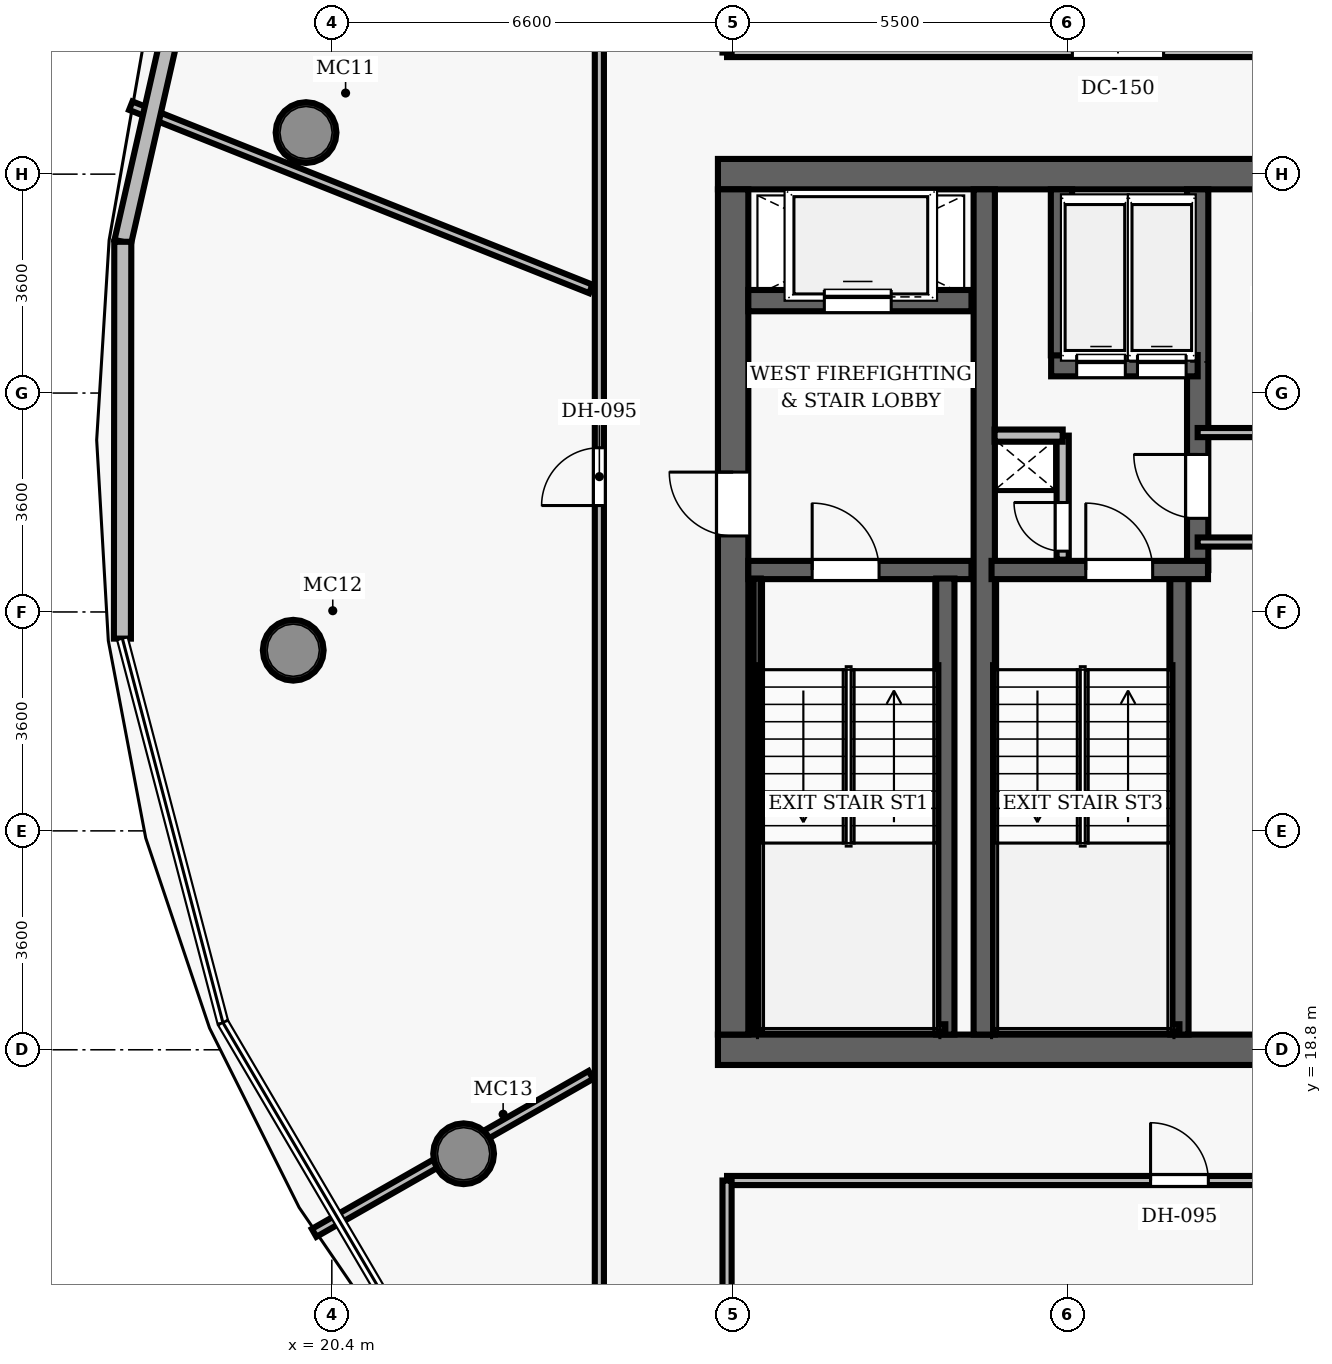
"""IFC4 building model, lengths in metres.
Left out: names, types, materials, properties, quantities, classifications, styles, units other than length and angle.
Written with IfcOpenShell. Run it as: python <this file> out.ifc"""

import sys

from ifc_helpers import new_model, si_unit, direction, frame, frame_2d, origin, origin_2d, place, context, subcontext, project, spatial, rectangle, hollow_circle, extrude, element, fill, save


model = new_model("IFC4")
c1 = context("Model", 3, precision=1e-05, world=origin(), true_north=direction((0.0, 1.0)))
c2 = subcontext(c1, "Body", "Model", "MODEL_VIEW")
j1 = project(units=[si_unit("LENGTHUNIT", "METRE"), si_unit("PLANEANGLEUNIT", "RADIAN")], contexts=[c1])
p1 = place(None, origin())
s1 = spatial("IfcSite", under=j1, at=p1, CompositionType="ELEMENT")
p2 = place(p1, origin())
s2 = spatial("IfcBuilding", under=s1, at=p2, CompositionType="ELEMENT")
p3 = place(p2, frame((0.0, 0.0, 303.65)))
s3 = spatial("IfcBuildingStorey", under=s2, at=p3, CompositionType="ELEMENT", Elevation=303.65)
p4 = place(p3, frame((26.75, 18.8, 0.0), z_axis=(0.0, 0.0, 1.0), x_axis=(1.0, 0.0, 0.0)))
e1 = element("IfcWall", 1, at=p4, inside=s3, PredefinedType="SHEAR", context=c2, shape_type="SweptSolid", body=[
    extrude(rectangle(XDim=22.5, YDim=0.5, at=frame_2d((11.25, 0.0))), origin(), (0.0, 0.0, 1.0), 3.85),
])
p5 = place(p4, frame((14.47, 0.0, 0.0)))
e2 = element("IfcOpeningElement", 2, at=p5, cuts=e1, PredefinedType="OPENING", context=c2, shape_type="SweptSolid", body=[
    extrude(rectangle(XDim=1.05, YDim=2.15, at=frame_2d((0.525, 1.075))), frame((0.0, 0.26, 0.0), z_axis=(0.0, -1.0, 0.0), x_axis=(1.0, 0.0, 0.0)), (0.0, 0.0, 1.0), 0.52),
])
p6 = place(p3, frame((26.75, 33.2, 0.0), z_axis=(0.0, 0.0, 1.0), x_axis=(1.0, 0.0, 0.0)))
e3 = element("IfcWall", 3, at=p6, inside=s3, PredefinedType="SHEAR", context=c2, shape_type="SweptSolid", body=[
    extrude(rectangle(XDim=22.5, YDim=0.5, at=frame_2d((11.25, 0.0))), origin(), (0.0, 0.0, 1.0), 3.85),
])
p7 = place(p3, frame((27.0, 19.05, 0.0), z_axis=(0.0, 0.0, 1.0), x_axis=(0.0, 1.0, 0.0)))
e4 = element("IfcWall", 4, at=p7, inside=s3, PredefinedType="SHEAR", context=c2, shape_type="SweptSolid", body=[
    extrude(rectangle(XDim=13.9, YDim=0.5, at=frame_2d((6.95, 0.0))), origin(), (0.0, 0.0, 1.0), 3.85),
])
p8 = place(p7, frame((8.2, 0.0, 0.0)))
e5 = element("IfcOpeningElement", 5, at=p8, cuts=e4, PredefinedType="OPENING", context=c2, shape_type="SweptSolid", body=[
    extrude(rectangle(XDim=1.05, YDim=2.15, at=frame_2d((0.525, 1.075))), frame((0.0, 0.26, 0.0), z_axis=(0.0, -1.0, 0.0), x_axis=(1.0, 0.0, 0.0)), (0.0, 0.0, 1.0), 0.52),
])
p9 = place(p3, frame((31.13, 19.05, 0.0), z_axis=(0.0, 0.0, 1.0), x_axis=(0.0, 1.0, 0.0)))
e6 = element("IfcWall", 6, at=p9, inside=s3, PredefinedType="SHEAR", context=c2, shape_type="SweptSolid", body=[
    extrude(rectangle(XDim=13.9, YDim=0.35, at=frame_2d((6.95, 0.0))), origin(), (0.0, 0.0, 1.0), 3.85),
])
for number, where, z_axis, x_axis in (
    (7, (19.976, 33.884, 0.0), (0.0, 0.0, 1.0), (1.0, 0.0, 0.0)),
    (8, (19.765, 25.371, 0.0), (0.0, 0.0, 1.0), (1.0, 0.0, 0.0)),
    (9, (22.567, 17.09, 0.0), (0.0, 0.0, 1.0), (1.0, 0.0, 0.0)),
):
    element("IfcColumn", number, at=place(p3, frame(where, z_axis=z_axis, x_axis=x_axis)), inside=s3, PredefinedType="COLUMN", context=c2, shape_type="SweptSolid", body=[
        extrude(hollow_circle(Radius=0.5, WallThickness=0.045, at=origin_2d()), origin(), (0.0, 0.0, 1.0), 3.85),
    ])
p10 = place(p3, frame((27.25, 26.69, 0.0), z_axis=(0.0, 0.0, 1.0), x_axis=(1.0, 0.0, 0.0)))
e10 = element("IfcWall", 10, at=p10, inside=s3, PredefinedType="SHEAR", context=c2, shape_type="SweptSolid", body=[
    extrude(rectangle(XDim=3.67, YDim=0.3, at=frame_2d((1.835, 0.0))), origin(), (0.0, 0.0, 1.0), 3.85),
])
p11 = place(p10, frame((1.05, 0.0, 0.0)))
e11 = element("IfcOpeningElement", 11, at=p11, cuts=e10, PredefinedType="OPENING", context=c2, shape_type="SweptSolid", body=[
    extrude(rectangle(XDim=1.1, YDim=2.15, at=frame_2d((0.55, 1.075))), frame((0.0, 0.16, 0.0), z_axis=(0.0, -1.0, 0.0), x_axis=(1.0, 0.0, 0.0)), (0.0, 0.0, 1.0), 0.32),
])
p12 = place(p3, frame((30.49, 19.05, 0.0), z_axis=(0.0, 0.0, 1.0), x_axis=(0.0, 1.0, 0.0)))
e12 = element("IfcWall", 12, at=p12, inside=s3, PredefinedType="SHEAR", context=c2, shape_type="SweptSolid", body=[
    extrude(rectangle(XDim=7.5, YDim=0.3, at=frame_2d((3.75, 0.0))), origin(), (0.0, 0.0, 1.0), 3.85),
])
p13 = place(p3, frame((27.395, 19.1, 0.0), z_axis=(0.0, 0.0, 1.0), x_axis=(0.0, 1.0, 0.0)))
e13 = element("IfcWall", 13, at=p13, inside=s3, PredefinedType="SHEAR", context=c2, shape_type="SweptSolid", body=[
    extrude(rectangle(XDim=7.45, YDim=0.12, at=frame_2d((3.725, 0.0))), origin(), (0.0, 0.0, 1.0), 3.85),
])
p14 = place(p3, frame((27.395, 19.16, 0.0), z_axis=(0.0, 0.0, 1.0), x_axis=(1.0, 0.0, 0.0)))
e14 = element("IfcWall", 14, at=p14, inside=s3, PredefinedType="SHEAR", context=c2, shape_type="SweptSolid", body=[
    extrude(rectangle(XDim=3.095, YDim=0.12, at=frame_2d((1.547, 0.0))), origin(), (0.0, 0.0, 1.0), 3.85),
])
p15 = place(p3, frame((27.25, 31.12, 0.0), z_axis=(0.0, 0.0, 1.0), x_axis=(1.0, 0.0, 0.0)))
e15 = element("IfcWall", 15, at=p15, inside=s3, PredefinedType="SHEAR", context=c2, shape_type="SweptSolid", body=[
    extrude(rectangle(XDim=3.67, YDim=0.35, at=frame_2d((1.835, 0.0))), origin(), (0.0, 0.0, 1.0), 3.015),
])
p16 = place(p15, frame((1.25, 0.0, 0.0)))
e16 = element("IfcOpeningElement", 16, at=p16, cuts=e15, PredefinedType="OPENING", context=c2, shape_type="SweptSolid", body=[
    extrude(rectangle(XDim=1.1, YDim=2.15, at=frame_2d((0.55, 1.075))), frame((0.0, 0.185, 0.0), z_axis=(0.0, -1.0, 0.0), x_axis=(1.0, 0.0, 0.0)), (0.0, 0.0, 1.0), 0.37),
])
p17 = place(p3, frame((34.34, 19.05, 0.0), z_axis=(0.0, 0.0, 1.0), x_axis=(0.0, 1.0, 0.0)))
e17 = element("IfcWall", 17, at=p17, inside=s3, PredefinedType="SHEAR", context=c2, shape_type="SweptSolid", body=[
    extrude(rectangle(XDim=7.5, YDim=0.3, at=frame_2d((3.75, 0.0))), origin(), (0.0, 0.0, 1.0), 3.85),
])
p18 = place(p3, frame((34.64, 26.69, 0.0), z_axis=(0.0, 0.0, 1.0), x_axis=(0.0, 1.0, 0.0)))
e18 = element("IfcWall", 18, at=p18, inside=s3, PredefinedType="SHEAR", context=c2, shape_type="SweptSolid", body=[
    extrude(rectangle(XDim=6.26, YDim=0.35, at=frame_2d((3.13, 0.0))), origin(), (0.0, 0.0, 1.0), 3.85),
])
p19 = place(p18, frame((0.85, 0.0, 0.0)))
e19 = element("IfcOpeningElement", 19, at=p19, cuts=e18, PredefinedType="OPENING", context=c2, shape_type="SweptSolid", body=[
    extrude(rectangle(XDim=1.05, YDim=2.15, at=frame_2d((0.525, 1.075))), frame((0.0, 0.185, 0.0), z_axis=(0.0, -1.0, 0.0), x_axis=(1.0, 0.0, 0.0)), (0.0, 0.0, 1.0), 0.37),
])
p20 = place(p3, frame((31.25, 26.69, 0.0), z_axis=(0.0, 0.0, 1.0), x_axis=(1.0, 0.0, 0.0)))
e20 = element("IfcWall", 20, at=p20, inside=s3, PredefinedType="SHEAR", context=c2, shape_type="SweptSolid", body=[
    extrude(rectangle(XDim=3.56, YDim=0.3, at=frame_2d((1.78, 0.0))), origin(), (0.0, 0.0, 1.0), 3.85),
])
p21 = place(p20, frame((1.55, 0.0, 0.0)))
e21 = element("IfcOpeningElement", 21, at=p21, cuts=e20, PredefinedType="OPENING", context=c2, shape_type="SweptSolid", body=[
    extrude(rectangle(XDim=1.1, YDim=2.15, at=frame_2d((0.55, 1.075))), frame((0.0, 0.16, 0.0), z_axis=(0.0, -1.0, 0.0), x_axis=(1.0, 0.0, 0.0)), (0.0, 0.0, 1.0), 0.32),
])
p22 = place(p3, frame((31.3, 19.16, 0.0), z_axis=(0.0, 0.0, 1.0), x_axis=(1.0, 0.0, 0.0)))
e22 = element("IfcWall", 22, at=p22, inside=s3, PredefinedType="SHEAR", context=c2, shape_type="SweptSolid", body=[
    extrude(rectangle(XDim=3.04, YDim=0.12, at=frame_2d((1.52, 0.0))), origin(), (0.0, 0.0, 1.0), 3.85),
])
p23 = place(p3, frame((32.23, 30.05, 0.0), z_axis=(0.0, 0.0, 1.0), x_axis=(1.0, 0.0, 0.0)))
e23 = element("IfcWall", 23, at=p23, inside=s3, PredefinedType="SHEAR", context=c2, shape_type="SweptSolid", body=[
    extrude(rectangle(XDim=2.41, YDim=0.35, at=frame_2d((1.205, 0.0))), origin(), (0.0, 0.0, 1.0), 3.015),
])
p24 = place(p23, frame((0.42, 0.0, 0.0)))
e24 = element("IfcOpeningElement", 24, at=p24, cuts=e23, PredefinedType="OPENING", context=c2, shape_type="SweptSolid", body=[
    extrude(rectangle(XDim=0.8, YDim=2.15, at=frame_2d((0.4, 1.075))), frame((0.0, 0.185, 0.0), z_axis=(0.0, -1.0, 0.0), x_axis=(1.0, 0.0, 0.0)), (0.0, 0.0, 1.0), 0.37),
])
p25 = place(p23, frame((1.42, 0.0, 0.0)))
e25 = element("IfcOpeningElement", 25, at=p25, cuts=e23, PredefinedType="OPENING", context=c2, shape_type="SweptSolid", body=[
    extrude(rectangle(XDim=0.8, YDim=2.15, at=frame_2d((0.4, 1.075))), frame((0.0, 0.185, 0.0), z_axis=(0.0, -1.0, 0.0), x_axis=(1.0, 0.0, 0.0)), (0.0, 0.0, 1.0), 0.37),
])
p26 = place(p3, frame((32.4, 30.22, 0.0), z_axis=(0.0, 0.0, 1.0), x_axis=(0.0, 1.0, 0.0)))
e26 = element("IfcWall", 26, at=p26, inside=s3, PredefinedType="SHEAR", context=c2, shape_type="SweptSolid", body=[
    extrude(rectangle(XDim=2.73, YDim=0.35, at=frame_2d((1.365, 0.0))), origin(), (0.0, 0.0, 1.0), 3.015),
])
p27 = place(p3, frame((32.42, 26.86, 0.0), z_axis=(0.0, 0.0, 1.0), x_axis=(0.0, 1.0, 0.0)))
e27 = element("IfcWall", 27, at=p27, inside=s3, PredefinedType="PARTITIONING", context=c2, shape_type="SweptSolid", body=[
    extrude(rectangle(XDim=2.04, YDim=0.2, at=frame_2d((1.02, 0.0))), origin(), (0.0, 0.0, 1.0), 3.015),
])
p28 = place(p27, frame((0.14, 0.0, 0.0)))
e28 = element("IfcOpeningElement", 28, at=p28, cuts=e27, PredefinedType="OPENING", context=c2, shape_type="SweptSolid", body=[
    extrude(rectangle(XDim=0.8, YDim=2.05, at=frame_2d((0.4, 1.025))), frame((0.0, 0.11, 0.0), z_axis=(0.0, -1.0, 0.0), x_axis=(1.0, 0.0, 0.0)), (0.0, 0.0, 1.0), 0.22),
])
p29 = place(p3, frame((31.3, 28.9, 0.0), z_axis=(0.0, 0.0, 1.0), x_axis=(1.0, 0.0, 0.0)))
e29 = element("IfcWall", 29, at=p29, inside=s3, PredefinedType="PARTITIONING", context=c2, shape_type="SweptSolid", body=[
    extrude(rectangle(XDim=1.12, YDim=0.2, at=frame_2d((0.56, 0.0))), origin(), (0.0, 0.0, 1.0), 3.015),
])
for number, where, z_axis, x_axis in (
    (30, (34.64, 27.15, 0.0), (0.0, 0.0, 1.0), (1.0, 0.0, 0.0)),
    (31, (34.64, 28.95, 0.0), (0.0, 0.0, 1.0), (1.0, 0.0, 0.0)),
):
    element("IfcWall", number, at=place(p3, frame(where, z_axis=z_axis, x_axis=x_axis)), inside=s3, PredefinedType="PARTITIONING", context=c2, shape_type="SweptSolid", body=[
        extrude(rectangle(XDim=6.36, YDim=0.15, at=frame_2d((3.18, 0.0))), origin(), (0.0, 0.0, 1.0), 3.015),
    ])
p30 = place(p3, frame((26.9, 16.65, 0.0), z_axis=(0.0, 0.0, 1.0), x_axis=(1.0, 0.0, 0.0)))
e32 = element("IfcWall", 32, at=p30, inside=s3, PredefinedType="PARTITIONING", context=c2, shape_type="SweptSolid", body=[
    extrude(rectangle(XDim=22.2, YDim=0.15, at=frame_2d((11.1, 0.0))), origin(), (0.0, 0.0, 1.0), 3.015),
])
p31 = place(p30, frame((6.965, 0.0, 0.0)))
e33 = element("IfcOpeningElement", 33, at=p31, cuts=e32, PredefinedType="OPENING", context=c2, shape_type="SweptSolid", body=[
    extrude(rectangle(XDim=0.95, YDim=2.15, at=frame_2d((0.475, 1.075))), frame((0.0, 0.085, 0.0), z_axis=(0.0, -1.0, 0.0), x_axis=(1.0, 0.0, 0.0)), (0.0, 0.0, 1.0), 0.17),
])
p32 = place(p30, frame((14.251, 0.0, 0.0)))
e34 = element("IfcOpeningElement", 34, at=p32, cuts=e32, PredefinedType="OPENING", context=c2, shape_type="SweptSolid", body=[
    extrude(rectangle(XDim=0.95, YDim=2.15, at=frame_2d((0.475, 1.075))), frame((0.0, 0.085, 0.0), z_axis=(0.0, -1.0, 0.0), x_axis=(1.0, 0.0, 0.0)), (0.0, 0.0, 1.0), 0.17),
])
p33 = place(p3, frame((26.9, 35.2, 0.0), z_axis=(0.0, 0.0, 1.0), x_axis=(1.0, 0.0, 0.0)))
e35 = element("IfcWall", 35, at=p33, inside=s3, PredefinedType="PARTITIONING", context=c2, shape_type="SweptSolid", body=[
    extrude(rectangle(XDim=10.05, YDim=0.15, at=frame_2d((5.025, 0.0))), origin(), (0.0, 0.0, 1.0), 3.015),
])
p34 = place(p33, frame((5.679, 0.0, 0.0)))
e36 = element("IfcOpeningElement", 36, at=p34, cuts=e35, PredefinedType="OPENING", context=c2, shape_type="SweptSolid", body=[
    extrude(rectangle(XDim=1.5, YDim=2.2, at=frame_2d((0.75, 1.1))), frame((0.0, 0.085, 0.0), z_axis=(0.0, -1.0, 0.0), x_axis=(1.0, 0.0, 0.0)), (0.0, 0.0, 1.0), 0.17),
])
p35 = place(p3, frame((24.8, 11.156, 0.0), z_axis=(0.0, 0.0, 1.0), x_axis=(0.0, 1.0, 0.0)))
e37 = element("IfcWall", 37, at=p35, inside=s3, PredefinedType="PARTITIONING", context=c2, shape_type="SweptSolid", body=[
    extrude(rectangle(XDim=30.243, YDim=0.15, at=frame_2d((15.122, 0.0))), origin(), (0.0, 0.0, 1.0), 3.015),
])
p36 = place(p35, frame((16.594, 0.0, 0.0)))
e38 = element("IfcOpeningElement", 38, at=p36, cuts=e37, PredefinedType="OPENING", context=c2, shape_type="SweptSolid", body=[
    extrude(rectangle(XDim=0.95, YDim=2.15, at=frame_2d((0.475, 1.075))), frame((0.0, 0.085, 0.0), z_axis=(0.0, -1.0, 0.0), x_axis=(1.0, 0.0, 0.0)), (0.0, 0.0, 1.0), 0.17),
])
p37 = place(p3, frame((26.9, 11.156, 0.0), z_axis=(0.0, 0.0, 1.0), x_axis=(0.0, 1.0, 0.0)))
e39 = element("IfcWall", 39, at=p37, inside=s3, PredefinedType="PARTITIONING", context=c2, shape_type="SweptSolid", body=[
    extrude(rectangle(XDim=5.493, YDim=0.15, at=frame_2d((2.747, 0.0))), origin(), (0.0, 0.0, 1.0), 3.015),
])
p38 = place(p3, frame((24.66, 31.312, 0.0), z_axis=(0.0, 0.0, 1.0), x_axis=(-0.929037966292, 0.369984401277, 0.0)))
e40 = element("IfcWall", 40, at=p38, inside=s3, PredefinedType="PARTITIONING", context=c2, shape_type="SweptSolid", body=[
    extrude(rectangle(XDim=8.144, YDim=0.15, at=frame_2d((4.072, 0.0))), origin(), (0.0, 0.0, 1.0), 3.015),
])
p39 = place(p3, frame((24.66, 18.387, 0.0), z_axis=(0.0, 0.0, 1.0), x_axis=(-0.868495322336, -0.495697362389, 0.0)))
e41 = element("IfcWall", 41, at=p39, inside=s3, PredefinedType="PARTITIONING", context=c2, shape_type="SweptSolid", body=[
    extrude(rectangle(XDim=5.24, YDim=0.15, at=frame_2d((2.62, 0.0))), origin(), (0.0, 0.0, 1.0), 3.015),
])
p40 = place(p3, frame((36.521, 16.51, 0.0), z_axis=(0.0, 0.0, 1.0), x_axis=(-0.15396623611, -0.988076109487, 0.0)))
e42 = element("IfcWall", 42, at=p40, inside=s3, PredefinedType="PARTITIONING", context=c2, shape_type="SweptSolid", body=[
    extrude(rectangle(XDim=12.424, YDim=0.15, at=frame_2d((6.212, 0.0))), origin(), (0.0, 0.0, 1.0), 3.015),
])
p41 = place(p3, frame((16.962, 32.088, 0.0), z_axis=(0.0, 0.0, 1.0), x_axis=(0.222003573724, 0.975045851873, 0.0)))
e43 = element("IfcWall", 43, at=p41, inside=s3, PredefinedType="SOLIDWALL", context=c2, shape_type="SweptSolid", body=[
    extrude(rectangle(XDim=6.345, YDim=0.28, at=frame_2d((3.173, 0.0))), origin(), (0.0, 0.0, 1.0), 3.6),
])
p42 = place(p3, frame((16.956, 25.562, 0.0), z_axis=(0.0, 0.0, 1.0), x_axis=(0.001010062707, 0.999999489887, 0.0)))
e44 = element("IfcWall", 44, at=p42, inside=s3, PredefinedType="SOLIDWALL", context=c2, shape_type="SweptSolid", body=[
    extrude(rectangle(XDim=6.526, YDim=0.28, at=frame_2d((3.263, 0.0))), origin(), (0.0, 0.0, 1.0), 3.6),
])
p43 = place(p11, origin())
e45 = element("IfcDoor", 45, at=p43, inside=s3, OperationType="SINGLE_SWING_LEFT", PredefinedType="DOOR", context=c2, shape_type="SweptSolid", body=[
    extrude(rectangle(XDim=1.1, YDim=2.15, at=frame_2d((0.55, 1.075))), frame((0.0, 0.025, 0.0), z_axis=(0.0, -1.0, 0.0), x_axis=(1.0, 0.0, 0.0)), (0.0, 0.0, 1.0), 0.05),
])
fill(e11, e45)
p44 = place(p8, origin())
e46 = element("IfcDoor", 46, at=p44, inside=s3, OperationType="SINGLE_SWING_RIGHT", PredefinedType="DOOR", context=c2, shape_type="SweptSolid", body=[
    extrude(rectangle(XDim=1.05, YDim=2.15, at=frame_2d((0.525, 1.075))), frame((0.0, 0.025, 0.0), z_axis=(0.0, -1.0, 0.0), x_axis=(1.0, 0.0, 0.0)), (0.0, 0.0, 1.0), 0.05),
])
fill(e5, e46)
p45 = place(p21, origin())
e47 = element("IfcDoor", 47, at=p45, inside=s3, OperationType="SINGLE_SWING_LEFT", PredefinedType="DOOR", context=c2, shape_type="SweptSolid", body=[
    extrude(rectangle(XDim=1.1, YDim=2.15, at=frame_2d((0.55, 1.075))), frame((0.0, 0.025, 0.0), z_axis=(0.0, -1.0, 0.0), x_axis=(1.0, 0.0, 0.0)), (0.0, 0.0, 1.0), 0.05),
])
fill(e21, e47)
p46 = place(p28, origin())
e48 = element("IfcDoor", 48, at=p46, inside=s3, OperationType="SINGLE_SWING_RIGHT", PredefinedType="DOOR", context=c2, shape_type="SweptSolid", body=[
    extrude(rectangle(XDim=0.8, YDim=2.05, at=frame_2d((0.4, 1.025))), frame((0.0, 0.025, 0.0), z_axis=(0.0, -1.0, 0.0), x_axis=(1.0, 0.0, 0.0)), (0.0, 0.0, 1.0), 0.05),
])
fill(e28, e48)
p47 = place(p19, origin())
e49 = element("IfcDoor", 49, at=p47, inside=s3, OperationType="SINGLE_SWING_RIGHT", PredefinedType="DOOR", context=c2, shape_type="SweptSolid", body=[
    extrude(rectangle(XDim=1.05, YDim=2.15, at=frame_2d((0.525, 1.075))), frame((0.0, 0.025, 0.0), z_axis=(0.0, -1.0, 0.0), x_axis=(1.0, 0.0, 0.0)), (0.0, 0.0, 1.0), 0.05),
])
fill(e19, e49)
p48 = place(p34, origin())
e50 = element("IfcDoor", 50, at=p48, inside=s3, OperationType="DOUBLE_DOOR_SINGLE_SWING", PredefinedType="DOOR", context=c2, shape_type="SweptSolid", body=[
    extrude(rectangle(XDim=1.5, YDim=2.2, at=frame_2d((0.75, 1.1))), frame((0.0, 0.025, 0.0), z_axis=(0.0, -1.0, 0.0), x_axis=(1.0, 0.0, 0.0)), (0.0, 0.0, 1.0), 0.05),
])
fill(e36, e50)
p49 = place(p36, origin())
e51 = element("IfcDoor", 51, at=p49, inside=s3, OperationType="SINGLE_SWING_LEFT", PredefinedType="DOOR", context=c2, shape_type="SweptSolid", body=[
    extrude(rectangle(XDim=0.95, YDim=2.15, at=frame_2d((0.475, 1.075))), frame((0.0, 0.025, 0.0), z_axis=(0.0, -1.0, 0.0), x_axis=(1.0, 0.0, 0.0)), (0.0, 0.0, 1.0), 0.05),
])
fill(e38, e51)
p50 = place(p31, origin())
e52 = element("IfcDoor", 52, at=p50, inside=s3, OperationType="SINGLE_SWING_LEFT", PredefinedType="DOOR", context=c2, shape_type="SweptSolid", body=[
    extrude(rectangle(XDim=0.95, YDim=2.15, at=frame_2d((0.475, 1.075))), frame((0.0, 0.025, 0.0), z_axis=(0.0, -1.0, 0.0), x_axis=(1.0, 0.0, 0.0)), (0.0, 0.0, 1.0), 0.05),
])
fill(e33, e52)
p51 = place(p16, origin())
e53 = element("IfcDoor", 53, at=p51, inside=s3, OperationType="SLIDING_TO_LEFT", PredefinedType="DOOR", context=c2, shape_type="SweptSolid", body=[
    extrude(rectangle(XDim=1.1, YDim=2.15, at=frame_2d((0.55, 1.075))), frame((0.0, 0.025, 0.0), z_axis=(0.0, -1.0, 0.0), x_axis=(1.0, 0.0, 0.0)), (0.0, 0.0, 1.0), 0.05),
])
fill(e16, e53)
p52 = place(p24, origin())
e54 = element("IfcDoor", 54, at=p52, inside=s3, OperationType="SLIDING_TO_LEFT", PredefinedType="DOOR", context=c2, shape_type="SweptSolid", body=[
    extrude(rectangle(XDim=0.8, YDim=2.15, at=frame_2d((0.4, 1.075))), frame((0.0, 0.025, 0.0), z_axis=(0.0, -1.0, 0.0), x_axis=(1.0, 0.0, 0.0)), (0.0, 0.0, 1.0), 0.05),
])
fill(e24, e54)
p53 = place(p25, origin())
e55 = element("IfcDoor", 55, at=p53, inside=s3, OperationType="SLIDING_TO_LEFT", PredefinedType="DOOR", context=c2, shape_type="SweptSolid", body=[
    extrude(rectangle(XDim=0.8, YDim=2.15, at=frame_2d((0.4, 1.075))), frame((0.0, 0.025, 0.0), z_axis=(0.0, -1.0, 0.0), x_axis=(1.0, 0.0, 0.0)), (0.0, 0.0, 1.0), 0.05),
])
fill(e25, e55)
save(model, sys.argv[1])
